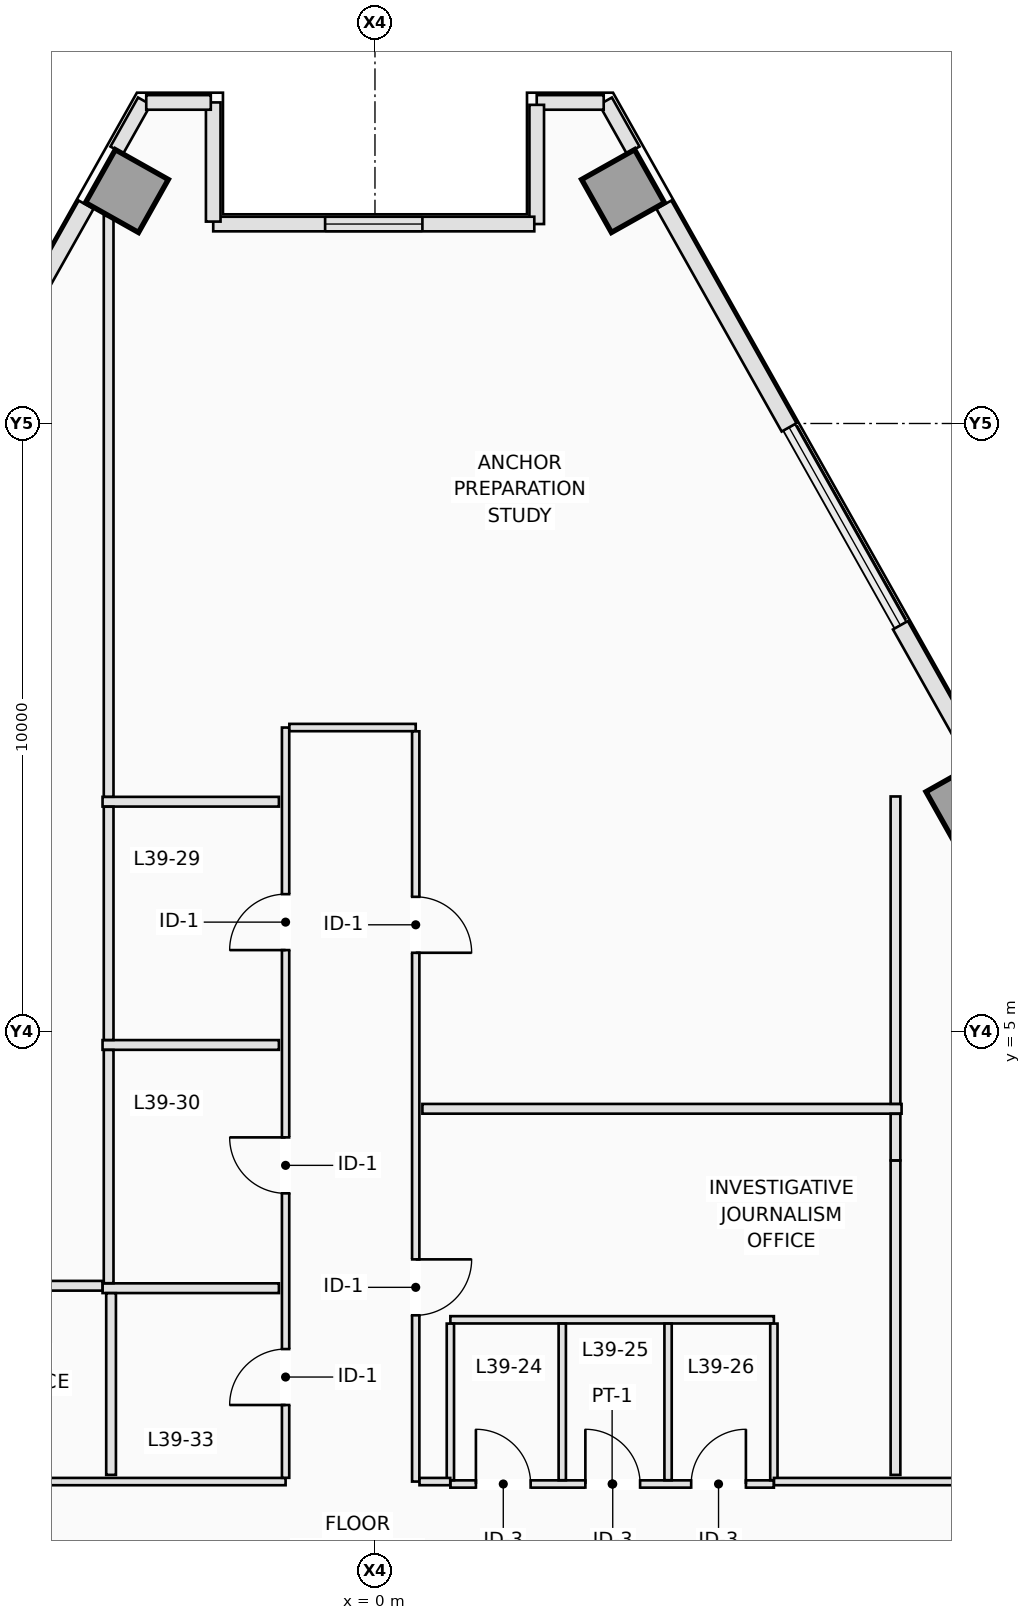
"""IFC4 building model, lengths in metres.
Left out: names, types, materials, properties, quantities, classifications, styles, units other than length and angle.
Written with IfcOpenShell. Run it as: python <this file> out.ifc"""

import sys

from ifc_helpers import new_model, si_unit, direction, frame, frame_2d, origin, origin_2d, place, context, subcontext, project, spatial, rectangle, extrude, element, fill, save


model = new_model("IFC4")
c1 = context("Model", 3, precision=1e-05, world=origin(), true_north=direction((0.0, 1.0)))
c2 = subcontext(c1, "Body", "Model", "MODEL_VIEW")
j1 = project(units=[si_unit("LENGTHUNIT", "METRE"), si_unit("PLANEANGLEUNIT", "RADIAN")], contexts=[c1])
p1 = place(None, origin())
s1 = spatial("IfcSite", under=j1, at=p1, CompositionType="ELEMENT")
p2 = place(p1, origin())
s2 = spatial("IfcBuilding", under=s1, at=p2, CompositionType="ELEMENT")
p3 = place(p2, frame((0.0, 0.0, 144.0)))
s3 = spatial("IfcBuildingStorey", under=s2, at=p3, CompositionType="ELEMENT", Elevation=144.0)
for number, where, z_axis, x_axis in (
    (1, (9.743, 8.753, 0.0), (0.0, 0.0, 1.0), (0.872, 0.49, 0.0)),
    (2, (4.079, 18.822, 0.0), (0.0, 0.0, 1.0), (0.872, 0.49, 0.0)),
    (3, (-4.079, 18.822, 0.0), (0.0, 0.0, 1.0), (-0.872, 0.49, 0.0)),
):
    element("IfcColumn", number, at=place(p3, frame(where, z_axis=z_axis, x_axis=x_axis)), inside=s3, PredefinedType="COLUMN", context=c2, shape_type="SweptSolid", body=[
        extrude(rectangle(XDim=1.0, YDim=1.0, at=origin_2d()), origin(), (0.0, 0.0, 1.0), 3.5),
    ])
p4 = place(p3, frame((3.792, 20.302, 0.0), z_axis=(0.0, 0.0, 1.0), x_axis=(0.490048346303, -0.871695255399, 0.0)))
e4 = element("IfcWall", 4, at=p4, inside=s3, PredefinedType="STANDARD", context=c2, shape_type="SweptSolid", body=[
    extrude(rectangle(XDim=0.926, YDim=0.24, at=frame_2d((0.463, 0.0))), origin(), (0.0, 0.0, 1.0), 3.25),
])
p5 = place(p3, frame((4.751, 18.597, 0.0), z_axis=(0.0, 0.0, 1.0), x_axis=(0.490250201787, -0.871581745821, 0.0)))
e5 = element("IfcWall", 5, at=p5, inside=s3, PredefinedType="STANDARD", context=c2, shape_type="SweptSolid", body=[
    extrude(rectangle(XDim=4.201, YDim=0.28, at=frame_2d((2.1, 0.0))), origin(), (0.0, 0.0, 1.0), 3.25),
])
p6 = place(p3, frame((8.641, 11.682, 0.0), z_axis=(0.0, 0.0, 1.0), x_axis=(0.490301864627, -0.871552684319, 0.0)))
e6 = element("IfcWall", 6, at=p6, inside=s3, PredefinedType="STANDARD", context=c2, shape_type="SweptSolid", body=[
    extrude(rectangle(XDim=2.568, YDim=0.28, at=frame_2d((1.284, 0.0))), origin(), (0.0, 0.0, 1.0), 3.25),
])
p7 = place(p3, frame((-4.246, 19.495, 0.0), z_axis=(0.0, 0.0, 1.0), x_axis=(0.490048346303, 0.871695255399, 0.0)))
e7 = element("IfcWall", 7, at=p7, inside=s3, PredefinedType="STANDARD", context=c2, shape_type="SweptSolid", body=[
    extrude(rectangle(XDim=0.926, YDim=0.24, at=frame_2d((0.463, 0.0))), origin(), (0.0, 0.0, 1.0), 3.25),
])
p8 = place(p3, frame((-6.81, 14.936, 0.0), z_axis=(0.0, 0.0, 1.0), x_axis=(0.490250201787, 0.871581745821, 0.0)))
e8 = element("IfcWall", 8, at=p8, inside=s3, PredefinedType="STANDARD", context=c2, shape_type="SweptSolid", body=[
    extrude(rectangle(XDim=4.201, YDim=0.28, at=frame_2d((2.1, 0.0))), origin(), (0.0, 0.0, 1.0), 3.25),
])
p9 = place(p3, frame((3.761, 20.28, 0.0), z_axis=(0.0, 0.0, 1.0), x_axis=(-1.0, 0.0, 0.0)))
e9 = element("IfcWall", 9, at=p9, inside=s3, PredefinedType="STANDARD", context=c2, shape_type="SweptSolid", body=[
    extrude(rectangle(XDim=1.102, YDim=0.24, at=frame_2d((0.551, 0.0))), origin(), (0.0, 0.0, 1.0), 3.25),
])
p10 = place(p3, frame((2.66, 20.24, 0.0), z_axis=(0.0, 0.0, 1.0), x_axis=(0.0, -1.0, 0.0)))
e10 = element("IfcWall", 10, at=p10, inside=s3, PredefinedType="STANDARD", context=c2, shape_type="SweptSolid", body=[
    extrude(rectangle(XDim=1.96, YDim=0.24, at=frame_2d((0.98, 0.0))), origin(), (0.0, 0.0, 1.0), 3.25),
])
p11 = place(p3, frame((2.62, 18.28, 0.0), z_axis=(0.0, 0.0, 1.0), x_axis=(-1.0, 0.0, 0.0)))
e11 = element("IfcWall", 11, at=p11, inside=s3, PredefinedType="STANDARD", context=c2, shape_type="SweptSolid", body=[
    extrude(rectangle(XDim=5.28, YDim=0.24, at=frame_2d((2.64, 0.0))), origin(), (0.0, 0.0, 1.0), 3.25),
])
p12 = place(p11, frame((1.84, 0.0, 0.9)))
e12 = element("IfcOpeningElement", 12, at=p12, cuts=e11, PredefinedType="OPENING", context=c2, shape_type="SweptSolid", body=[
    extrude(rectangle(XDim=1.6, YDim=2.1, at=frame_2d((0.8, 1.05))), frame((0.0, 0.13, 0.0), z_axis=(0.0, -1.0, 0.0), x_axis=(1.0, 0.0, 0.0)), (0.0, 0.0, 1.0), 0.26),
])
p13 = place(p3, frame((-2.66, 18.32, 0.0), z_axis=(0.0, 0.0, 1.0), x_axis=(0.0, 1.0, 0.0)))
e13 = element("IfcWall", 13, at=p13, inside=s3, PredefinedType="STANDARD", context=c2, shape_type="SweptSolid", body=[
    extrude(rectangle(XDim=1.96, YDim=0.24, at=frame_2d((0.98, 0.0))), origin(), (0.0, 0.0, 1.0), 3.25),
])
p14 = place(p3, frame((-2.7, 20.28, 0.0), z_axis=(0.0, 0.0, 1.0), x_axis=(-1.0, 0.0, 0.0)))
e14 = element("IfcWall", 14, at=p14, inside=s3, PredefinedType="STANDARD", context=c2, shape_type="SweptSolid", body=[
    extrude(rectangle(XDim=1.062, YDim=0.24, at=frame_2d((0.531, 0.0))), origin(), (0.0, 0.0, 1.0), 3.25),
])
p15 = place(p3, frame((1.24, -2.44, 0.0), z_axis=(0.0, 0.0, 1.0), x_axis=(1.0, 0.0, 0.0)))
e15 = element("IfcWall", 15, at=p15, inside=s3, PredefinedType="PARTITIONING", context=c2, shape_type="SweptSolid", body=[
    extrude(rectangle(XDim=5.32, YDim=0.12, at=frame_2d((2.66, 0.0))), origin(), (0.0, 0.0, 1.0), 2.891),
])
p16 = place(p15, frame((0.42, 0.0, 0.0)))
e16 = element("IfcOpeningElement", 16, at=p16, cuts=e15, PredefinedType="OPENING", context=c2, shape_type="SweptSolid", body=[
    extrude(rectangle(XDim=0.9, YDim=2.12, at=frame_2d((0.45, 1.06))), frame((0.0, 0.07, 0.0), z_axis=(0.0, -1.0, 0.0), x_axis=(1.0, 0.0, 0.0)), (0.0, 0.0, 1.0), 0.14),
])
p17 = place(p15, frame((2.22, 0.0, 0.0)))
e17 = element("IfcOpeningElement", 17, at=p17, cuts=e15, PredefinedType="OPENING", context=c2, shape_type="SweptSolid", body=[
    extrude(rectangle(XDim=0.9, YDim=2.12, at=frame_2d((0.45, 1.06))), frame((0.0, 0.07, 0.0), z_axis=(0.0, -1.0, 0.0), x_axis=(1.0, 0.0, 0.0)), (0.0, 0.0, 1.0), 0.14),
])
p18 = place(p15, frame((3.96, 0.0, 0.0)))
e18 = element("IfcOpeningElement", 18, at=p18, cuts=e15, PredefinedType="OPENING", context=c2, shape_type="SweptSolid", body=[
    extrude(rectangle(XDim=0.9, YDim=2.12, at=frame_2d((0.45, 1.06))), frame((0.0, 0.07, 0.0), z_axis=(0.0, -1.0, 0.0), x_axis=(1.0, 0.0, 0.0)), (0.0, 0.0, 1.0), 0.14),
])
p19 = place(p3, frame((1.24, 0.26, 0.0), z_axis=(0.0, 0.0, 1.0), x_axis=(1.0, 0.0, 0.0)))
e19 = element("IfcWall", 19, at=p19, inside=s3, PredefinedType="PARTITIONING", context=c2, shape_type="SweptSolid", body=[
    extrude(rectangle(XDim=5.32, YDim=0.12, at=frame_2d((2.66, 0.0))), origin(), (0.0, 0.0, 1.0), 3.25),
])
for number, where, z_axis, x_axis in (
    (20, (1.24, -2.378, 0.0), (0.0, 0.0, 1.0), (0.0, 1.0, 0.0)),
    (21, (3.08, -2.378, 0.0), (0.0, 0.0, 1.0), (0.0, 1.0, 0.0)),
    (22, (4.82, -2.378, 0.0), (0.0, 0.0, 1.0), (0.0, 1.0, 0.0)),
    (23, (6.56, -2.378, 0.0), (0.0, 0.0, 1.0), (0.0, 1.0, 0.0)),
):
    element("IfcWall", number, at=place(p3, frame(where, z_axis=z_axis, x_axis=x_axis)), inside=s3, PredefinedType="PARTITIONING", context=c2, shape_type="SweptSolid", body=[
        extrude(rectangle(XDim=2.576, YDim=0.12, at=frame_2d((1.288, 0.0))), origin(), (0.0, 0.0, 1.0), 3.25),
    ])
p20 = place(p3, frame((-12.348, -2.4, 0.0), z_axis=(0.0, 0.0, 1.0), x_axis=(1.0, 0.0, 0.0)))
e24 = element("IfcWall", 24, at=p20, inside=s3, PredefinedType="PARTITIONING", context=c2, shape_type="SweptSolid", body=[
    extrude(rectangle(XDim=10.878, YDim=0.12, at=frame_2d((5.439, 0.0))), origin(), (0.0, 0.0, 1.0), 2.891),
])
p21 = place(p20, frame((4.378, 0.0, 0.0)))
e25 = element("IfcOpeningElement", 25, at=p21, cuts=e24, PredefinedType="OPENING", context=c2, shape_type="SweptSolid", body=[
    extrude(rectangle(XDim=0.92, YDim=2.12, at=frame_2d((0.46, 1.06))), frame((0.0, 0.07, 0.0), z_axis=(0.0, -1.0, 0.0), x_axis=(1.0, 0.0, 0.0)), (0.0, 0.0, 1.0), 0.14),
])
p22 = place(p3, frame((-1.47, -2.338, 0.0), z_axis=(0.0, 0.0, 1.0), x_axis=(0.0, 1.0, 0.0)))
e26 = element("IfcWall", 26, at=p22, inside=s3, PredefinedType="PARTITIONING", context=c2, shape_type="SweptSolid", body=[
    extrude(rectangle(XDim=12.338, YDim=0.12, at=frame_2d((6.169, 0.0))), origin(), (0.0, 0.0, 1.0), 3.25),
])
p23 = place(p22, frame((8.678, 0.0, 0.0)))
e27 = element("IfcOpeningElement", 27, at=p23, cuts=e26, PredefinedType="OPENING", context=c2, shape_type="SweptSolid", body=[
    extrude(rectangle(XDim=0.92, YDim=2.12, at=frame_2d((0.46, 1.06))), frame((0.0, 0.07, 0.0), z_axis=(0.0, -1.0, 0.0), x_axis=(1.0, 0.0, 0.0)), (0.0, 0.0, 1.0), 0.14),
])
p24 = place(p22, frame((4.678, 0.0, 0.0)))
e28 = element("IfcOpeningElement", 28, at=p24, cuts=e26, PredefinedType="OPENING", context=c2, shape_type="SweptSolid", body=[
    extrude(rectangle(XDim=0.92, YDim=2.12, at=frame_2d((0.46, 1.06))), frame((0.0, 0.07, 0.0), z_axis=(0.0, -1.0, 0.0), x_axis=(1.0, 0.0, 0.0)), (0.0, 0.0, 1.0), 0.14),
])
p25 = place(p22, frame((1.197, 0.0, 0.0)))
e29 = element("IfcOpeningElement", 29, at=p25, cuts=e26, PredefinedType="OPENING", context=c2, shape_type="SweptSolid", body=[
    extrude(rectangle(XDim=0.92, YDim=2.12, at=frame_2d((0.46, 1.06))), frame((0.0, 0.07, 0.0), z_axis=(0.0, -1.0, 0.0), x_axis=(1.0, 0.0, 0.0)), (0.0, 0.0, 1.0), 0.14),
])
p26 = place(p3, frame((-1.408, 10.0, 0.0), z_axis=(0.0, 0.0, 1.0), x_axis=(1.0, 0.0, 0.0)))
e30 = element("IfcWall", 30, at=p26, inside=s3, PredefinedType="PARTITIONING", context=c2, shape_type="SweptSolid", body=[
    extrude(rectangle(XDim=2.078, YDim=0.12, at=frame_2d((1.039, 0.0))), origin(), (0.0, 0.0, 1.0), 3.25),
])
p27 = place(p3, frame((0.67, 9.938, 0.0), z_axis=(0.0, 0.0, 1.0), x_axis=(0.0, -1.0, 0.0)))
e31 = element("IfcWall", 31, at=p27, inside=s3, PredefinedType="PARTITIONING", context=c2, shape_type="SweptSolid", body=[
    extrude(rectangle(XDim=12.338, YDim=0.12, at=frame_2d((6.169, 0.0))), origin(), (0.0, 0.0, 1.0), 3.25),
])
p28 = place(p27, frame((2.722, 0.0, 0.0)))
e32 = element("IfcOpeningElement", 32, at=p28, cuts=e31, PredefinedType="OPENING", context=c2, shape_type="SweptSolid", body=[
    extrude(rectangle(XDim=0.92, YDim=2.12, at=frame_2d((0.46, 1.06))), frame((0.0, 0.07, 0.0), z_axis=(0.0, -1.0, 0.0), x_axis=(1.0, 0.0, 0.0)), (0.0, 0.0, 1.0), 0.14),
])
p29 = place(p27, frame((8.684, 0.0, 0.0)))
e33 = element("IfcOpeningElement", 33, at=p29, cuts=e31, PredefinedType="OPENING", context=c2, shape_type="SweptSolid", body=[
    extrude(rectangle(XDim=0.92, YDim=2.12, at=frame_2d((0.46, 1.06))), frame((0.0, 0.07, 0.0), z_axis=(0.0, -1.0, 0.0), x_axis=(1.0, 0.0, 0.0)), (0.0, 0.0, 1.0), 0.14),
])
p30 = place(p3, frame((0.732, -2.4, 0.0), z_axis=(0.0, 0.0, 1.0), x_axis=(1.0, 0.0, 0.0)))
e34 = element("IfcWall", 34, at=p30, inside=s3, PredefinedType="PARTITIONING", context=c2, shape_type="SweptSolid", body=[
    extrude(rectangle(XDim=0.506, YDim=0.12, at=frame_2d((0.253, 0.0))), origin(), (0.0, 0.0, 1.0), 2.891),
])
p31 = place(p3, frame((6.562, -2.4, 0.0), z_axis=(0.0, 0.0, 1.0), x_axis=(1.0, 0.0, 0.0)))
e35 = element("IfcWall", 35, at=p31, inside=s3, PredefinedType="PARTITIONING", context=c2, shape_type="SweptSolid", body=[
    extrude(rectangle(XDim=5.848, YDim=0.12, at=frame_2d((2.924, 0.0))), origin(), (0.0, 0.0, 1.0), 3.25),
])
p32 = place(p31, frame((3.334, 0.0, 0.0)))
e36 = element("IfcOpeningElement", 36, at=p32, cuts=e35, PredefinedType="OPENING", context=c2, shape_type="SweptSolid", body=[
    extrude(rectangle(XDim=0.92, YDim=2.12, at=frame_2d((0.46, 1.06))), frame((0.0, 0.07, 0.0), z_axis=(0.0, -1.0, 0.0), x_axis=(1.0, 0.0, 0.0)), (0.0, 0.0, 1.0), 0.14),
])
p33 = place(p3, frame((-1.58, 8.78, 0.0), z_axis=(0.0, 0.0, 1.0), x_axis=(-1.0, 0.0, 0.0)))
e37 = element("IfcWall", 37, at=p33, inside=s3, PredefinedType="PARTITIONING", context=c2, shape_type="SweptSolid", body=[
    extrude(rectangle(XDim=2.9, YDim=0.16, at=frame_2d((1.45, 0.0))), origin(), (0.0, 0.0, 1.0), 3.25),
])
p34 = place(p3, frame((8.66, 3.73, 0.0), z_axis=(0.0, 0.0, 1.0), x_axis=(-1.0, 0.0, 0.0)))
e38 = element("IfcWall", 38, at=p34, inside=s3, PredefinedType="PARTITIONING", context=c2, shape_type="SweptSolid", body=[
    extrude(rectangle(XDim=7.88, YDim=0.16, at=frame_2d((3.94, 0.0))), origin(), (0.0, 0.0, 1.0), 3.25),
])
p35 = place(p3, frame((8.56, 8.866, 0.0), z_axis=(0.0, 0.0, 1.0), x_axis=(0.0, -1.0, 0.0)))
e39 = element("IfcWall", 39, at=p35, inside=s3, PredefinedType="PARTITIONING", context=c2, shape_type="SweptSolid", body=[
    extrude(rectangle(XDim=5.054, YDim=0.16, at=frame_2d((2.527, 0.0))), origin(), (0.0, 0.0, 1.0), 3.25),
])
p36 = place(p3, frame((-4.38, 8.862, 0.0), z_axis=(0.0, 0.0, 1.0), x_axis=(0.0, 1.0, 0.0)))
e40 = element("IfcWall", 40, at=p36, inside=s3, PredefinedType="PARTITIONING", context=c2, shape_type="SweptSolid", body=[
    extrude(rectangle(XDim=9.553, YDim=0.16, at=frame_2d((4.777, 0.0))), origin(), (0.0, 0.0, 1.0), 3.25),
])
p37 = place(p3, frame((-1.58, 4.78, 0.0), z_axis=(0.0, 0.0, 1.0), x_axis=(-1.0, 0.0, 0.0)))
e41 = element("IfcWall", 41, at=p37, inside=s3, PredefinedType="PARTITIONING", context=c2, shape_type="SweptSolid", body=[
    extrude(rectangle(XDim=2.9, YDim=0.16, at=frame_2d((1.45, 0.0))), origin(), (0.0, 0.0, 1.0), 3.25),
])
p38 = place(p3, frame((-4.38, 4.862, 0.0), z_axis=(0.0, 0.0, 1.0), x_axis=(0.0, 1.0, 0.0)))
e42 = element("IfcWall", 42, at=p38, inside=s3, PredefinedType="PARTITIONING", context=c2, shape_type="SweptSolid", body=[
    extrude(rectangle(XDim=3.836, YDim=0.16, at=frame_2d((1.918, 0.0))), origin(), (0.0, 0.0, 1.0), 3.25),
])
p39 = place(p3, frame((-1.58, 0.78, 0.0), z_axis=(0.0, 0.0, 1.0), x_axis=(-1.0, 0.0, 0.0)))
e43 = element("IfcWall", 43, at=p39, inside=s3, PredefinedType="PARTITIONING", context=c2, shape_type="SweptSolid", body=[
    extrude(rectangle(XDim=2.9, YDim=0.16, at=frame_2d((1.45, 0.0))), origin(), (0.0, 0.0, 1.0), 3.25),
])
p40 = place(p3, frame((-4.38, 0.862, 0.0), z_axis=(0.0, 0.0, 1.0), x_axis=(0.0, 1.0, 0.0)))
e44 = element("IfcWall", 44, at=p40, inside=s3, PredefinedType="PARTITIONING", context=c2, shape_type="SweptSolid", body=[
    extrude(rectangle(XDim=3.836, YDim=0.16, at=frame_2d((1.918, 0.0))), origin(), (0.0, 0.0, 1.0), 3.25),
])
p41 = place(p3, frame((8.56, 2.88, 0.0), z_axis=(0.0, 0.0, 1.0), x_axis=(0.0, -1.0, 0.0)))
e45 = element("IfcWall", 45, at=p41, inside=s3, PredefinedType="PARTITIONING", context=c2, shape_type="SweptSolid", body=[
    extrude(rectangle(XDim=5.17, YDim=0.16, at=frame_2d((2.585, 0.0))), origin(), (0.0, 0.0, 1.0), 3.25),
])
p42 = place(p3, frame((8.56, 3.648, 0.0), z_axis=(0.0, 0.0, 1.0), x_axis=(0.0, -1.0, 0.0)))
e46 = element("IfcWall", 46, at=p42, inside=s3, PredefinedType="PARTITIONING", context=c2, shape_type="SweptSolid", body=[
    extrude(rectangle(XDim=0.766, YDim=0.16, at=frame_2d((0.383, 0.0))), origin(), (0.0, 0.0, 1.0), 3.25),
])
p43 = place(p3, frame((-4.34, 0.698, 0.0), z_axis=(0.0, 0.0, 1.0), x_axis=(0.0, -1.0, 0.0)))
e47 = element("IfcWall", 47, at=p43, inside=s3, PredefinedType="PARTITIONING", context=c2, shape_type="SweptSolid", body=[
    extrude(rectangle(XDim=2.988, YDim=0.16, at=frame_2d((1.494, 0.0))), origin(), (0.0, 0.0, 1.0), 3.25),
])
p44 = place(p3, frame((-10.598, 0.82, 0.0), z_axis=(0.0, 0.0, 1.0), x_axis=(1.0, 0.0, 0.0)))
e48 = element("IfcWall", 48, at=p44, inside=s3, PredefinedType="PARTITIONING", context=c2, shape_type="SweptSolid", body=[
    extrude(rectangle(XDim=6.116, YDim=0.16, at=frame_2d((3.058, 0.0))), origin(), (0.0, 0.0, 1.0), 3.25),
])
p45 = place(p12, origin())
e49 = element("IfcWindow", 49, at=p45, inside=s3, PartitioningType="SINGLE_PANEL", PredefinedType="WINDOW", context=c2, shape_type="SweptSolid", body=[
    extrude(rectangle(XDim=1.6, YDim=2.1, at=frame_2d((0.8, 1.05))), frame((0.0, 0.03, 0.0), z_axis=(0.0, -1.0, 0.0), x_axis=(1.0, 0.0, 0.0)), (0.0, 0.0, 1.0), 0.06),
])
fill(e12, e49)
p46 = place(p16, origin())
e50 = element("IfcDoor", 50, at=p46, inside=s3, OperationType="SINGLE_SWING_LEFT", PredefinedType="DOOR", context=c2, shape_type="SweptSolid", body=[
    extrude(rectangle(XDim=0.9, YDim=2.12, at=frame_2d((0.45, 1.06))), frame((0.0, 0.025, 0.0), z_axis=(0.0, -1.0, 0.0), x_axis=(1.0, 0.0, 0.0)), (0.0, 0.0, 1.0), 0.05),
])
fill(e16, e50)
p47 = place(p17, origin())
e51 = element("IfcDoor", 51, at=p47, inside=s3, OperationType="SINGLE_SWING_LEFT", PredefinedType="DOOR", context=c2, shape_type="SweptSolid", body=[
    extrude(rectangle(XDim=0.9, YDim=2.12, at=frame_2d((0.45, 1.06))), frame((0.0, 0.025, 0.0), z_axis=(0.0, -1.0, 0.0), x_axis=(1.0, 0.0, 0.0)), (0.0, 0.0, 1.0), 0.05),
])
fill(e17, e51)
p48 = place(p18, origin())
e52 = element("IfcDoor", 52, at=p48, inside=s3, OperationType="SINGLE_SWING_RIGHT", PredefinedType="DOOR", context=c2, shape_type="SweptSolid", body=[
    extrude(rectangle(XDim=0.9, YDim=2.12, at=frame_2d((0.45, 1.06))), frame((0.0, 0.025, 0.0), z_axis=(0.0, -1.0, 0.0), x_axis=(1.0, 0.0, 0.0)), (0.0, 0.0, 1.0), 0.05),
])
fill(e18, e52)
p49 = place(p28, origin())
e53 = element("IfcDoor", 53, at=p49, inside=s3, OperationType="SINGLE_SWING_RIGHT", PredefinedType="DOOR", context=c2, shape_type="SweptSolid", body=[
    extrude(rectangle(XDim=0.92, YDim=2.12, at=frame_2d((0.46, 1.06))), frame((0.0, 0.025, 0.0), z_axis=(0.0, -1.0, 0.0), x_axis=(1.0, 0.0, 0.0)), (0.0, 0.0, 1.0), 0.05),
])
fill(e32, e53)
p50 = place(p23, origin())
e54 = element("IfcDoor", 54, at=p50, inside=s3, OperationType="SINGLE_SWING_LEFT", PredefinedType="DOOR", context=c2, shape_type="SweptSolid", body=[
    extrude(rectangle(XDim=0.92, YDim=2.12, at=frame_2d((0.46, 1.06))), frame((0.0, 0.025, 0.0), z_axis=(0.0, -1.0, 0.0), x_axis=(1.0, 0.0, 0.0)), (0.0, 0.0, 1.0), 0.05),
])
fill(e27, e54)
p51 = place(p24, origin())
e55 = element("IfcDoor", 55, at=p51, inside=s3, OperationType="SINGLE_SWING_RIGHT", PredefinedType="DOOR", context=c2, shape_type="SweptSolid", body=[
    extrude(rectangle(XDim=0.92, YDim=2.12, at=frame_2d((0.46, 1.06))), frame((0.0, 0.025, 0.0), z_axis=(0.0, -1.0, 0.0), x_axis=(1.0, 0.0, 0.0)), (0.0, 0.0, 1.0), 0.05),
])
fill(e28, e55)
p52 = place(p29, origin())
e56 = element("IfcDoor", 56, at=p52, inside=s3, OperationType="SINGLE_SWING_LEFT", PredefinedType="DOOR", context=c2, shape_type="SweptSolid", body=[
    extrude(rectangle(XDim=0.92, YDim=2.12, at=frame_2d((0.46, 1.06))), frame((0.0, 0.025, 0.0), z_axis=(0.0, -1.0, 0.0), x_axis=(1.0, 0.0, 0.0)), (0.0, 0.0, 1.0), 0.05),
])
fill(e33, e56)
p53 = place(p25, origin())
e57 = element("IfcDoor", 57, at=p53, inside=s3, OperationType="SINGLE_SWING_LEFT", PredefinedType="DOOR", context=c2, shape_type="SweptSolid", body=[
    extrude(rectangle(XDim=0.92, YDim=2.12, at=frame_2d((0.46, 1.06))), frame((0.0, 0.025, 0.0), z_axis=(0.0, -1.0, 0.0), x_axis=(1.0, 0.0, 0.0)), (0.0, 0.0, 1.0), 0.05),
])
fill(e29, e57)
save(model, sys.argv[1])
